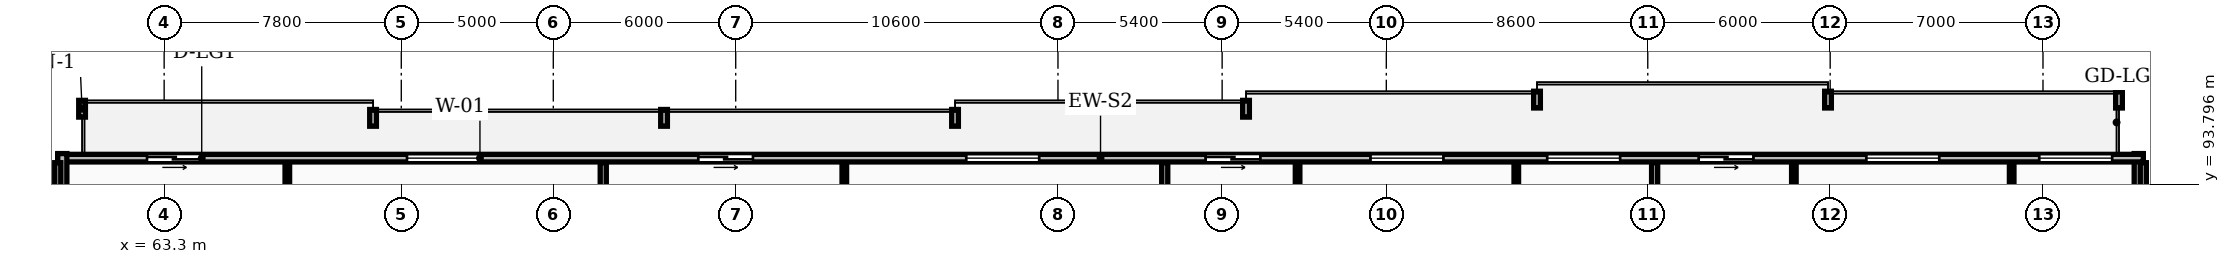
"""IFC4 building model, lengths in metres.
Left out: names, types, materials, properties, quantities, classifications, styles, units other than length and angle.
Written with IfcOpenShell. Run it as: python <this file> out.ifc"""

import sys

from ifc_helpers import new_model, si_unit, direction, frame, frame_2d, origin, place, context, subcontext, project, spatial, rectangle, extrude, element, fill, save


model = new_model("IFC4")
c1 = context("Model", 3, precision=1e-05, world=origin(), true_north=direction((0.0, 1.0)))
c2 = subcontext(c1, "Body", "Model", "MODEL_VIEW")
j1 = project(units=[si_unit("LENGTHUNIT", "METRE"), si_unit("PLANEANGLEUNIT", "RADIAN")], contexts=[c1])
p1 = place(None, origin())
s1 = spatial("IfcSite", under=j1, at=p1, CompositionType="ELEMENT")
p2 = place(p1, origin())
s2 = spatial("IfcBuilding", under=s1, at=p2, CompositionType="ELEMENT")
p3 = place(p2, frame((0.0, 0.0, 201.1)))
s3 = spatial("IfcBuildingStorey", under=s2, at=p3, CompositionType="ELEMENT", Elevation=201.1)
p4 = place(p3, frame((128.25, 91.2, 0.0), z_axis=(0.0, 0.0, 1.0), x_axis=(0.0, 1.0, 0.0)))
e1 = element("IfcWall", 1, at=p4, inside=s3, PredefinedType="STANDARD", context=c2, shape_type="SweptSolid", body=[
    extrude(rectangle(XDim=3.6, YDim=0.3, at=frame_2d((1.8, 0.0))), origin(), (0.0, 0.0, 1.0), 2.97),
])
p5 = place(p3, frame((128.4, 94.65, 0.0), z_axis=(0.0, 0.0, 1.0), x_axis=(-1.0, 0.0, 0.0)))
e2 = element("IfcWall", 2, at=p5, inside=s3, PredefinedType="STANDARD", context=c2, shape_type="SweptSolid", body=[
    extrude(rectangle(XDim=68.6, YDim=0.25, at=frame_2d((34.3, 0.0))), origin(), (0.0, 0.0, 1.0), 2.97),
])
p6 = place(p5, frame((63.864, 0.0, 0.0)))
e3 = element("IfcOpeningElement", 3, at=p6, cuts=e2, PredefinedType="OPENING", context=c2, shape_type="SweptSolid", body=[
    extrude(rectangle(XDim=1.8, YDim=2.2, at=frame_2d((0.9, 1.1))), frame((0.0, 0.135, 0.0), z_axis=(0.0, -1.0, 0.0), x_axis=(1.0, 0.0, 0.0)), (0.0, 0.0, 1.0), 0.27),
])
p7 = place(p5, frame((54.713, 0.0, 0.85)))
e4 = element("IfcOpeningElement", 4, at=p7, cuts=e2, PredefinedType="OPENING", context=c2, shape_type="SweptSolid", body=[
    extrude(rectangle(XDim=2.4, YDim=1.9, at=frame_2d((1.2, 0.95))), frame((0.0, 0.135, 0.0), z_axis=(0.0, -1.0, 0.0), x_axis=(1.0, 0.0, 0.0)), (0.0, 0.0, 1.0), 0.27),
])
p8 = place(p5, frame((45.732, 0.0, 0.0)))
e5 = element("IfcOpeningElement", 5, at=p8, cuts=e2, PredefinedType="OPENING", context=c2, shape_type="SweptSolid", body=[
    extrude(rectangle(XDim=1.8, YDim=2.2, at=frame_2d((0.9, 1.1))), frame((0.0, 0.135, 0.0), z_axis=(0.0, -1.0, 0.0), x_axis=(1.0, 0.0, 0.0)), (0.0, 0.0, 1.0), 0.27),
])
p9 = place(p5, frame((36.318, 0.0, 0.85)))
e6 = element("IfcOpeningElement", 6, at=p9, cuts=e2, PredefinedType="OPENING", context=c2, shape_type="SweptSolid", body=[
    extrude(rectangle(XDim=2.4, YDim=1.9, at=frame_2d((1.2, 0.95))), frame((0.0, 0.135, 0.0), z_axis=(0.0, -1.0, 0.0), x_axis=(1.0, 0.0, 0.0)), (0.0, 0.0, 1.0), 0.27),
])
p10 = place(p5, frame((23.021, 0.0, 0.85)))
e7 = element("IfcOpeningElement", 7, at=p10, cuts=e2, PredefinedType="OPENING", context=c2, shape_type="SweptSolid", body=[
    extrude(rectangle(XDim=2.4, YDim=1.9, at=frame_2d((1.2, 0.95))), frame((0.0, 0.135, 0.0), z_axis=(0.0, -1.0, 0.0), x_axis=(1.0, 0.0, 0.0)), (0.0, 0.0, 1.0), 0.27),
])
p11 = place(p5, frame((29.043, 0.0, 0.0)))
e8 = element("IfcOpeningElement", 8, at=p11, cuts=e2, PredefinedType="OPENING", context=c2, shape_type="SweptSolid", body=[
    extrude(rectangle(XDim=1.8, YDim=2.2, at=frame_2d((0.9, 1.1))), frame((0.0, 0.135, 0.0), z_axis=(0.0, -1.0, 0.0), x_axis=(1.0, 0.0, 0.0)), (0.0, 0.0, 1.0), 0.27),
])
p12 = place(p5, frame((17.209, 0.0, 0.85)))
e9 = element("IfcOpeningElement", 9, at=p12, cuts=e2, PredefinedType="OPENING", context=c2, shape_type="SweptSolid", body=[
    extrude(rectangle(XDim=2.4, YDim=1.9, at=frame_2d((1.2, 0.95))), frame((0.0, 0.135, 0.0), z_axis=(0.0, -1.0, 0.0), x_axis=(1.0, 0.0, 0.0)), (0.0, 0.0, 1.0), 0.27),
])
p13 = place(p5, frame((6.712, 0.0, 0.85)))
e10 = element("IfcOpeningElement", 10, at=p13, cuts=e2, PredefinedType="OPENING", context=c2, shape_type="SweptSolid", body=[
    extrude(rectangle(XDim=2.4, YDim=1.9, at=frame_2d((1.2, 0.95))), frame((0.0, 0.135, 0.0), z_axis=(0.0, -1.0, 0.0), x_axis=(1.0, 0.0, 0.0)), (0.0, 0.0, 1.0), 0.27),
])
p14 = place(p5, frame((12.824, 0.0, 0.0)))
e11 = element("IfcOpeningElement", 11, at=p14, cuts=e2, PredefinedType="OPENING", context=c2, shape_type="SweptSolid", body=[
    extrude(rectangle(XDim=1.8, YDim=2.2, at=frame_2d((0.9, 1.1))), frame((0.0, 0.135, 0.0), z_axis=(0.0, -1.0, 0.0), x_axis=(1.0, 0.0, 0.0)), (0.0, 0.0, 1.0), 0.27),
])
p15 = place(p5, frame((1.025, 0.0, 0.85)))
e12 = element("IfcOpeningElement", 12, at=p15, cuts=e2, PredefinedType="OPENING", context=c2, shape_type="SweptSolid", body=[
    extrude(rectangle(XDim=2.4, YDim=1.9, at=frame_2d((1.2, 0.95))), frame((0.0, 0.135, 0.0), z_axis=(0.0, -1.0, 0.0), x_axis=(1.0, 0.0, 0.0)), (0.0, 0.0, 1.0), 0.27),
])
p16 = place(p3, frame((59.95, 94.8, 0.0), z_axis=(0.0, 0.0, 1.0), x_axis=(0.0, -1.0, 0.0)))
e13 = element("IfcWall", 13, at=p16, inside=s3, PredefinedType="STANDARD", context=c2, shape_type="SweptSolid", body=[
    extrude(rectangle(XDim=3.6, YDim=0.3, at=frame_2d((1.8, 0.0))), origin(), (0.0, 0.0, 1.0), 2.97),
])
for number, where, z_axis, x_axis in (
    (14, (59.8, 70.18, 0.0), (0.0, 0.0, 1.0), (0.0, 1.0, 0.0)),
    (15, (128.4, 70.18, 0.0), (0.0, 0.0, 1.0), (0.0, 1.0, 0.0)),
):
    element("IfcWall", number, at=place(p3, frame(where, z_axis=z_axis, x_axis=x_axis)), inside=s3, PredefinedType="PARTITIONING", context=c2, shape_type="SweptSolid", body=[
        extrude(rectangle(XDim=24.32, YDim=0.2, at=frame_2d((12.16, 0.0))), origin(), (0.0, 0.0, 1.0), 2.277),
    ])
p17 = place(p3, frame((77.743, 70.18, 0.0), z_axis=(0.0, 0.0, 1.0), x_axis=(0.0, 1.0, 0.0)))
e16 = element("IfcWall", 16, at=p17, inside=s3, PredefinedType="PARTITIONING", context=c2, shape_type="SweptSolid", body=[
    extrude(rectangle(XDim=24.32, YDim=0.2, at=frame_2d((12.16, 0.0))), origin(), (0.0, 0.0, 1.0), 2.97),
])
p18 = place(p3, frame((67.352, 89.33, 0.0), z_axis=(0.0, 0.0, 1.0), x_axis=(0.0, 1.0, 0.0)))
e17 = element("IfcWall", 17, at=p18, inside=s3, PredefinedType="PARTITIONING", context=c2, shape_type="SweptSolid", body=[
    extrude(rectangle(XDim=5.17, YDim=0.15, at=frame_2d((2.585, 0.0))), origin(), (0.0, 0.0, 1.0), 2.97),
])
p19 = place(p3, frame((96.212, 70.18, 0.0), z_axis=(0.0, 0.0, 1.0), x_axis=(0.0, 1.0, 0.0)))
e18 = element("IfcWall", 18, at=p19, inside=s3, PredefinedType="PARTITIONING", context=c2, shape_type="SweptSolid", body=[
    extrude(rectangle(XDim=24.32, YDim=0.2, at=frame_2d((12.16, 0.0))), origin(), (0.0, 0.0, 1.0), 2.97),
])
p20 = place(p3, frame((85.672, 89.33, 0.0), z_axis=(0.0, 0.0, 1.0), x_axis=(0.0, 1.0, 0.0)))
e19 = element("IfcWall", 19, at=p20, inside=s3, PredefinedType="PARTITIONING", context=c2, shape_type="SweptSolid", body=[
    extrude(rectangle(XDim=5.17, YDim=0.15, at=frame_2d((2.585, 0.0))), origin(), (0.0, 0.0, 1.0), 2.97),
])
p21 = place(p3, frame((112.326, 70.18, 0.0), z_axis=(0.0, 0.0, 1.0), x_axis=(0.0, 1.0, 0.0)))
e20 = element("IfcWall", 20, at=p21, inside=s3, PredefinedType="PARTITIONING", context=c2, shape_type="SweptSolid", body=[
    extrude(rectangle(XDim=24.32, YDim=0.2, at=frame_2d((12.16, 0.0))), origin(), (0.0, 0.0, 1.0), 2.277),
])
p22 = place(p3, frame((100.582, 84.19, 0.0), z_axis=(0.0, 0.0, 1.0), x_axis=(0.0, 1.0, 0.0)))
e21 = element("IfcWall", 21, at=p22, inside=s3, PredefinedType="PARTITIONING", context=c2, shape_type="SweptSolid", body=[
    extrude(rectangle(XDim=10.31, YDim=0.15, at=frame_2d((5.155, 0.0))), origin(), (0.0, 0.0, 1.0), 2.97),
])
p23 = place(p22, frame((3.82, 0.0, 0.0)))
e22 = element("IfcOpeningElement", 22, at=p23, cuts=e21, PredefinedType="OPENING", context=c2, shape_type="SweptSolid", body=[
    extrude(rectangle(XDim=0.92, YDim=2.08, at=frame_2d((0.46, 1.04))), frame((0.0, 0.085, 0.0), z_axis=(0.0, -1.0, 0.0), x_axis=(1.0, 0.0, 0.0)), (0.0, 0.0, 1.0), 0.17),
])
p24 = place(p3, frame((107.776, 86.92, 0.0), z_axis=(0.0, 0.0, 1.0), x_axis=(0.0, 1.0, 0.0)))
e23 = element("IfcWall", 23, at=p24, inside=s3, PredefinedType="PARTITIONING", context=c2, shape_type="SweptSolid", body=[
    extrude(rectangle(XDim=7.58, YDim=0.15, at=frame_2d((3.79, 0.0))), origin(), (0.0, 0.0, 1.0), 2.97),
])
p25 = place(p24, frame((1.09, 0.0, 0.0)))
e24 = element("IfcOpeningElement", 24, at=p25, cuts=e23, PredefinedType="OPENING", context=c2, shape_type="SweptSolid", body=[
    extrude(rectangle(XDim=0.92, YDim=2.08, at=frame_2d((0.46, 1.04))), frame((0.0, 0.085, 0.0), z_axis=(0.0, -1.0, 0.0), x_axis=(1.0, 0.0, 0.0)), (0.0, 0.0, 1.0), 0.17),
])
p26 = place(p3, frame((116.906, 84.19, 0.0), z_axis=(0.0, 0.0, 1.0), x_axis=(0.0, 1.0, 0.0)))
e25 = element("IfcWall", 25, at=p26, inside=s3, PredefinedType="PARTITIONING", context=c2, shape_type="SweptSolid", body=[
    extrude(rectangle(XDim=10.31, YDim=0.15, at=frame_2d((5.155, 0.0))), origin(), (0.0, 0.0, 1.0), 2.97),
])
p27 = place(p26, frame((3.82, 0.0, 0.0)))
e26 = element("IfcOpeningElement", 26, at=p27, cuts=e25, PredefinedType="OPENING", context=c2, shape_type="SweptSolid", body=[
    extrude(rectangle(XDim=0.92, YDim=2.08, at=frame_2d((0.46, 1.04))), frame((0.0, 0.085, 0.0), z_axis=(0.0, -1.0, 0.0), x_axis=(1.0, 0.0, 0.0)), (0.0, 0.0, 1.0), 0.17),
])
p28 = place(p3, frame((124.07, 86.81, 0.0), z_axis=(0.0, 0.0, 1.0), x_axis=(0.0, 1.0, 0.0)))
e27 = element("IfcWall", 27, at=p28, inside=s3, PredefinedType="PARTITIONING", context=c2, shape_type="SweptSolid", body=[
    extrude(rectangle(XDim=7.69, YDim=0.15, at=frame_2d((3.845, 0.0))), origin(), (0.0, 0.0, 1.0), 2.97),
])
p29 = place(p28, frame((1.2, 0.0, 0.0)))
e28 = element("IfcOpeningElement", 28, at=p29, cuts=e27, PredefinedType="OPENING", context=c2, shape_type="SweptSolid", body=[
    extrude(rectangle(XDim=0.92, YDim=2.08, at=frame_2d((0.46, 1.04))), frame((0.0, 0.085, 0.0), z_axis=(0.0, -1.0, 0.0), x_axis=(1.0, 0.0, 0.0)), (0.0, 0.0, 1.0), 0.17),
])
p30 = place(p6, origin())
e29 = element("IfcDoor", 29, at=p30, inside=s3, OperationType="SLIDING_TO_LEFT", PredefinedType="DOOR", context=c2, shape_type="SweptSolid", body=[
    extrude(rectangle(XDim=1.8, YDim=2.2, at=frame_2d((0.9, 1.1))), frame((0.0, 0.025, 0.0), z_axis=(0.0, -1.0, 0.0), x_axis=(1.0, 0.0, 0.0)), (0.0, 0.0, 1.0), 0.05),
])
fill(e3, e29)
p31 = place(p7, origin())
e30 = element("IfcWindow", 30, at=p31, inside=s3, PartitioningType="DOUBLE_PANEL_VERTICAL", PredefinedType="WINDOW", context=c2, shape_type="SweptSolid", body=[
    extrude(rectangle(XDim=2.4, YDim=1.9, at=frame_2d((1.2, 0.95))), frame((0.0, 0.03, 0.0), z_axis=(0.0, -1.0, 0.0), x_axis=(1.0, 0.0, 0.0)), (0.0, 0.0, 1.0), 0.06),
])
fill(e4, e30)
p32 = place(p8, origin())
e31 = element("IfcDoor", 31, at=p32, inside=s3, OperationType="SLIDING_TO_LEFT", PredefinedType="DOOR", context=c2, shape_type="SweptSolid", body=[
    extrude(rectangle(XDim=1.8, YDim=2.2, at=frame_2d((0.9, 1.1))), frame((0.0, 0.025, 0.0), z_axis=(0.0, -1.0, 0.0), x_axis=(1.0, 0.0, 0.0)), (0.0, 0.0, 1.0), 0.05),
])
fill(e5, e31)
p33 = place(p9, origin())
e32 = element("IfcWindow", 32, at=p33, inside=s3, PartitioningType="DOUBLE_PANEL_VERTICAL", PredefinedType="WINDOW", context=c2, shape_type="SweptSolid", body=[
    extrude(rectangle(XDim=2.4, YDim=1.9, at=frame_2d((1.2, 0.95))), frame((0.0, 0.03, 0.0), z_axis=(0.0, -1.0, 0.0), x_axis=(1.0, 0.0, 0.0)), (0.0, 0.0, 1.0), 0.06),
])
fill(e6, e32)
p34 = place(p10, origin())
e33 = element("IfcWindow", 33, at=p34, inside=s3, PartitioningType="DOUBLE_PANEL_VERTICAL", PredefinedType="WINDOW", context=c2, shape_type="SweptSolid", body=[
    extrude(rectangle(XDim=2.4, YDim=1.9, at=frame_2d((1.2, 0.95))), frame((0.0, 0.03, 0.0), z_axis=(0.0, -1.0, 0.0), x_axis=(1.0, 0.0, 0.0)), (0.0, 0.0, 1.0), 0.06),
])
fill(e7, e33)
p35 = place(p11, origin())
e34 = element("IfcDoor", 34, at=p35, inside=s3, OperationType="SLIDING_TO_LEFT", PredefinedType="DOOR", context=c2, shape_type="SweptSolid", body=[
    extrude(rectangle(XDim=1.8, YDim=2.2, at=frame_2d((0.9, 1.1))), frame((0.0, 0.025, 0.0), z_axis=(0.0, -1.0, 0.0), x_axis=(1.0, 0.0, 0.0)), (0.0, 0.0, 1.0), 0.05),
])
fill(e8, e34)
p36 = place(p12, origin())
e35 = element("IfcWindow", 35, at=p36, inside=s3, PartitioningType="DOUBLE_PANEL_VERTICAL", PredefinedType="WINDOW", context=c2, shape_type="SweptSolid", body=[
    extrude(rectangle(XDim=2.4, YDim=1.9, at=frame_2d((1.2, 0.95))), frame((0.0, 0.03, 0.0), z_axis=(0.0, -1.0, 0.0), x_axis=(1.0, 0.0, 0.0)), (0.0, 0.0, 1.0), 0.06),
])
fill(e9, e35)
p37 = place(p13, origin())
e36 = element("IfcWindow", 36, at=p37, inside=s3, PartitioningType="DOUBLE_PANEL_VERTICAL", PredefinedType="WINDOW", context=c2, shape_type="SweptSolid", body=[
    extrude(rectangle(XDim=2.4, YDim=1.9, at=frame_2d((1.2, 0.95))), frame((0.0, 0.03, 0.0), z_axis=(0.0, -1.0, 0.0), x_axis=(1.0, 0.0, 0.0)), (0.0, 0.0, 1.0), 0.06),
])
fill(e10, e36)
p38 = place(p14, origin())
e37 = element("IfcDoor", 37, at=p38, inside=s3, OperationType="SLIDING_TO_LEFT", PredefinedType="DOOR", context=c2, shape_type="SweptSolid", body=[
    extrude(rectangle(XDim=1.8, YDim=2.2, at=frame_2d((0.9, 1.1))), frame((0.0, 0.025, 0.0), z_axis=(0.0, -1.0, 0.0), x_axis=(1.0, 0.0, 0.0)), (0.0, 0.0, 1.0), 0.05),
])
fill(e11, e37)
p39 = place(p15, origin())
e38 = element("IfcWindow", 38, at=p39, inside=s3, PartitioningType="DOUBLE_PANEL_VERTICAL", PredefinedType="WINDOW", context=c2, shape_type="SweptSolid", body=[
    extrude(rectangle(XDim=2.4, YDim=1.9, at=frame_2d((1.2, 0.95))), frame((0.0, 0.03, 0.0), z_axis=(0.0, -1.0, 0.0), x_axis=(1.0, 0.0, 0.0)), (0.0, 0.0, 1.0), 0.06),
])
fill(e12, e38)
save(model, sys.argv[1])
